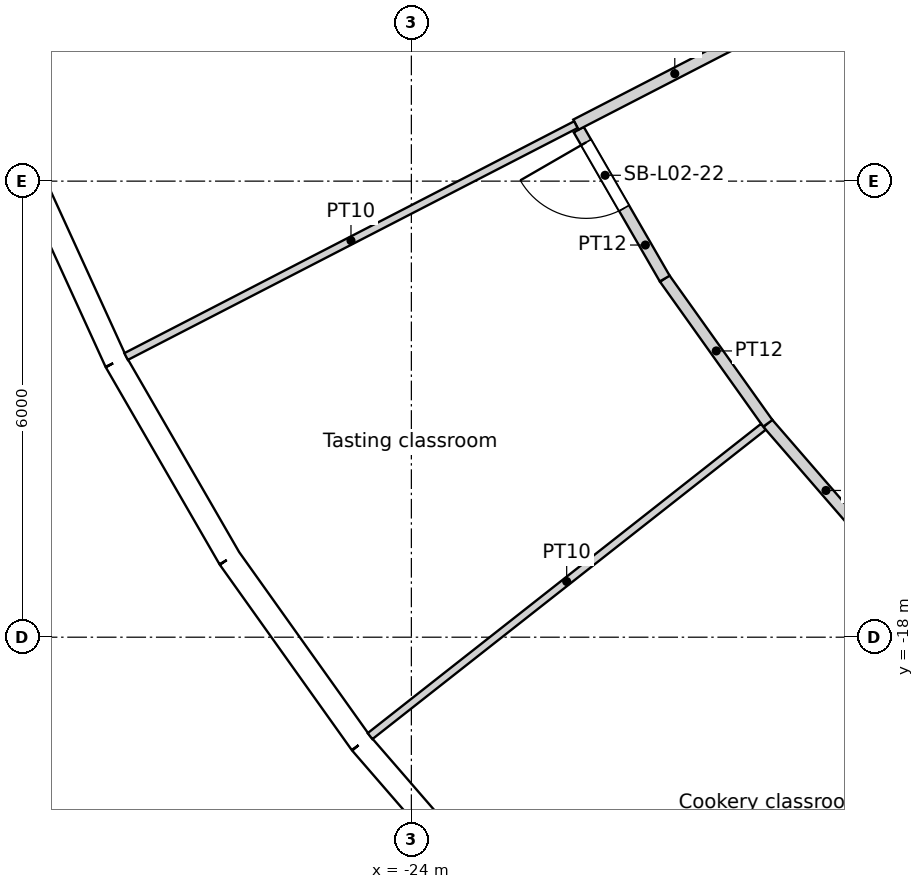
"""IFC4 building model, lengths in metres.
Left out: names, types, materials, properties, quantities, classifications, styles, units other than length and angle.
Written with IfcOpenShell. Run it as: python <this file> out.ifc"""

import sys

from ifc_helpers import new_model, si_unit, direction, frame, frame_2d, origin, origin_2d, place, context, subcontext, project, spatial, rectangle, circle, extrude, element, fill, save


model = new_model("IFC4")
c1 = context("Model", 3, precision=1e-05, world=origin(), true_north=direction((0.0, 1.0)))
c2 = subcontext(c1, "Body", "Model", "MODEL_VIEW")
j1 = project(units=[si_unit("LENGTHUNIT", "METRE"), si_unit("PLANEANGLEUNIT", "RADIAN")], contexts=[c1])
p1 = place(None, origin())
s1 = spatial("IfcSite", under=j1, at=p1, CompositionType="ELEMENT")
p2 = place(p1, origin())
s2 = spatial("IfcBuilding", under=s1, at=p2, CompositionType="ELEMENT")
p3 = place(p2, frame((0.0, 0.0, 13.8)))
s3 = spatial("IfcBuildingStorey", under=s2, at=p3, CompositionType="ELEMENT", Elevation=13.8)
for number, where, z_axis, x_axis in (
    (1, (-26.909, -13.873, 0.0), (0.0, 0.0, 1.0), (1.0, 0.0, 0.0)),
    (2, (-23.797, -18.715, 0.0), (0.0, 0.0, 1.0), (1.0, 0.0, 0.0)),
):
    element("IfcColumn", number, at=place(p3, frame(where, z_axis=z_axis, x_axis=x_axis)), inside=s3, PredefinedType="COLUMN", context=c2, shape_type="SweptSolid", body=[
        extrude(circle(Radius=0.7, at=origin_2d()), origin(), (0.0, 0.0, 1.0), 4.8),
    ])
p4 = place(p3, frame((-20.509, -13.489, 0.0), z_axis=(0.0, 0.0, 1.0), x_axis=(1.0, 0.0, 0.0)))
e3 = element("IfcColumn", 3, at=p4, inside=s3, PredefinedType="COLUMN", context=c2, shape_type="SweptSolid", body=[
    extrude(circle(Radius=0.75, at=origin_2d()), origin(), (0.0, 0.0, 1.0), 4.8),
])
p5 = place(p3, frame((-29.127, -11.661, 0.0), z_axis=(0.0, 0.0, 1.0), x_axis=(0.415373250944, -0.909651066289, 0.0)))
e4 = element("IfcWall", 4, at=p5, inside=s3, PredefinedType="SOLIDWALL", context=c2, shape_type="SweptSolid", body=[
    extrude(rectangle(XDim=2.986, YDim=0.3, at=frame_2d((1.493, 0.0))), origin(), (0.0, 0.0, 1.0), 4.35),
])
p6 = place(p5, frame((1.493, 0.0, 2.0)))
e5 = element("IfcOpeningElement", 5, at=p6, cuts=e4, PredefinedType="OPENING", context=c2, shape_type="SweptSolid", body=[
    extrude(circle(Radius=1.2, at=origin_2d()), frame((0.0, 0.16, 0.0), z_axis=(0.0, -1.0, 0.0), x_axis=(1.0, 0.0, 0.0)), (0.0, 0.0, 1.0), 0.32),
])
p7 = place(p3, frame((-27.887, -14.377, 0.0), z_axis=(0.0, 0.0, 1.0), x_axis=(0.500017373705, -0.866015372839, 0.0)))
e6 = element("IfcWall", 6, at=p7, inside=s3, PredefinedType="SOLIDWALL", context=c2, shape_type="SweptSolid", body=[
    extrude(rectangle(XDim=2.986, YDim=0.3, at=frame_2d((1.493, 0.0))), origin(), (0.0, 0.0, 1.0), 4.35),
])
p8 = place(p7, frame((1.493, 0.0, 2.0)))
e7 = element("IfcOpeningElement", 7, at=p8, cuts=e6, PredefinedType="OPENING", context=c2, shape_type="SweptSolid", body=[
    extrude(circle(Radius=1.2, at=origin_2d()), frame((0.0, 0.16, 0.0), z_axis=(0.0, -1.0, 0.0), x_axis=(1.0, 0.0, 0.0)), (0.0, 0.0, 1.0), 0.32),
])
p9 = place(p3, frame((-26.394, -16.962, 0.0), z_axis=(0.0, 0.0, 1.0), x_axis=(0.580100533892, -0.814544885551, 0.0)))
e8 = element("IfcWall", 8, at=p9, inside=s3, PredefinedType="SOLIDWALL", context=c2, shape_type="SweptSolid", body=[
    extrude(rectangle(XDim=2.986, YDim=0.3, at=frame_2d((1.493, 0.0))), origin(), (0.0, 0.0, 1.0), 4.35),
])
p10 = place(p9, frame((1.493, 0.0, 2.0)))
e9 = element("IfcOpeningElement", 9, at=p10, cuts=e8, PredefinedType="OPENING", context=c2, shape_type="SweptSolid", body=[
    extrude(circle(Radius=1.2, at=origin_2d()), frame((0.0, 0.16, 0.0), z_axis=(0.0, -1.0, 0.0), x_axis=(1.0, 0.0, 0.0)), (0.0, 0.0, 1.0), 0.32),
])
p11 = place(p3, frame((-24.662, -19.394, 0.0), z_axis=(0.0, 0.0, 1.0), x_axis=(0.654809121128, -0.755794294029, 0.0)))
e10 = element("IfcWall", 10, at=p11, inside=s3, PredefinedType="SOLIDWALL", context=c2, shape_type="SweptSolid", body=[
    extrude(rectangle(XDim=2.986, YDim=0.3, at=frame_2d((1.493, 0.0))), origin(), (0.0, 0.0, 1.0), 4.35),
])
p12 = place(p11, frame((1.493, 0.0, 2.0)))
e11 = element("IfcOpeningElement", 11, at=p12, cuts=e10, PredefinedType="OPENING", context=c2, shape_type="SweptSolid", body=[
    extrude(circle(Radius=1.2, at=origin_2d()), frame((0.0, 0.16, 0.0), z_axis=(0.0, -1.0, 0.0), x_axis=(1.0, 0.0, 0.0)), (0.0, 0.0, 1.0), 0.32),
])
p13 = place(p3, frame((-27.753, -14.308, 0.0), z_axis=(0.0, 0.0, 1.0), x_axis=(0.888828839168, 0.458239342117, 0.0)))
e12 = element("IfcWall", 12, at=p13, inside=s3, PredefinedType="PARTITIONING", context=c2, shape_type="SweptSolid", body=[
    extrude(rectangle(XDim=6.658, YDim=0.1, at=frame_2d((3.329, 0.0))), origin(), (0.0, 0.0, 1.0), 3.75),
])
p14 = place(p3, frame((-24.544, -19.302, 0.0), z_axis=(0.0, 0.0, 1.0), x_axis=(0.786055722677, 0.618155644515, 0.0)))
e13 = element("IfcWall", 13, at=p14, inside=s3, PredefinedType="PARTITIONING", context=c2, shape_type="SweptSolid", body=[
    extrude(rectangle(XDim=6.583, YDim=0.1, at=frame_2d((3.291, 0.0))), origin(), (0.0, 0.0, 1.0), 3.75),
])
p15 = place(p3, frame((-20.667, -13.282, 0.0), z_axis=(0.0, 0.0, 1.0), x_axis=(-0.500049307386, 0.86599693428, 0.0)))
e14 = element("IfcWall", 14, at=p15, inside=s3, PredefinedType="PARTITIONING", context=c2, shape_type="SweptSolid", body=[
    extrude(rectangle(XDim=2.263, YDim=0.15, at=frame_2d((1.131, 0.0))), origin(), (0.0, 0.0, 1.0), 3.75),
])
p16 = place(p15, frame((1.069, 0.0, 0.0)))
e15 = element("IfcOpeningElement", 15, at=p16, cuts=e14, PredefinedType="OPENING", context=c2, shape_type="SweptSolid", body=[
    extrude(rectangle(XDim=1.0, YDim=2.1, at=frame_2d((0.5, 1.05))), frame((0.0, 0.075, 0.0), z_axis=(0.0, -1.0, 0.0), x_axis=(1.0, 0.0, 0.0)), (0.0, 0.0, 1.0), 0.15),
])
p17 = place(p3, frame((-21.836, -11.257, 0.0), z_axis=(0.0, 0.0, 1.0), x_axis=(0.888822270684, 0.458252082522, 0.0)))
e16 = element("IfcWall", 16, at=p17, inside=s3, PredefinedType="PARTITIONING", context=c2, shape_type="SweptSolid", body=[
    extrude(rectangle(XDim=2.928, YDim=0.15, at=frame_2d((1.464, 0.0))), origin(), (0.0, 0.0, 1.0), 3.75),
])
p18 = place(p3, frame((-20.667, -13.282, 0.0), z_axis=(0.0, 0.0, 1.0), x_axis=(0.580032319147, -0.814593462252, 0.0)))
e17 = element("IfcWall", 17, at=p18, inside=s3, PredefinedType="PARTITIONING", context=c2, shape_type="SweptSolid", body=[
    extrude(rectangle(XDim=2.338, YDim=0.15, at=frame_2d((1.169, 0.0))), origin(), (0.0, 0.0, 1.0), 3.75),
])
p19 = place(p3, frame((-19.311, -15.186, 0.0), z_axis=(0.0, 0.0, 1.0), x_axis=(0.654866925236, -0.755744209526, 0.0)))
e18 = element("IfcWall", 18, at=p19, inside=s3, PredefinedType="PARTITIONING", context=c2, shape_type="SweptSolid", body=[
    extrude(rectangle(XDim=2.338, YDim=0.15, at=frame_2d((1.169, 0.0))), origin(), (0.0, 0.0, 1.0), 3.75),
])
p20 = place(p6, origin())
e19 = element("IfcWindow", 19, at=p20, inside=s3, PartitioningType="SINGLE_PANEL", PredefinedType="WINDOW", context=c2, shape_type="SweptSolid", body=[
    extrude(circle(Radius=1.2, at=origin_2d()), frame((0.0, 0.12, 0.0), z_axis=(0.0, -1.0, 0.0), x_axis=(1.0, 0.0, 0.0)), (0.0, 0.0, 1.0), 0.1),
])
fill(e5, e19)
p21 = place(p8, origin())
e20 = element("IfcWindow", 20, at=p21, inside=s3, PartitioningType="SINGLE_PANEL", PredefinedType="WINDOW", context=c2, shape_type="SweptSolid", body=[
    extrude(circle(Radius=1.2, at=origin_2d()), frame((0.0, 0.12, 0.0), z_axis=(0.0, -1.0, 0.0), x_axis=(1.0, 0.0, 0.0)), (0.0, 0.0, 1.0), 0.1),
])
fill(e7, e20)
p22 = place(p10, origin())
e21 = element("IfcWindow", 21, at=p22, inside=s3, PartitioningType="SINGLE_PANEL", PredefinedType="WINDOW", context=c2, shape_type="SweptSolid", body=[
    extrude(circle(Radius=1.2, at=origin_2d()), frame((0.0, 0.12, 0.0), z_axis=(0.0, -1.0, 0.0), x_axis=(1.0, 0.0, 0.0)), (0.0, 0.0, 1.0), 0.1),
])
fill(e9, e21)
p23 = place(p12, origin())
e22 = element("IfcWindow", 22, at=p23, inside=s3, PartitioningType="SINGLE_PANEL", PredefinedType="WINDOW", context=c2, shape_type="SweptSolid", body=[
    extrude(circle(Radius=1.2, at=origin_2d()), frame((0.0, 0.12, 0.0), z_axis=(0.0, -1.0, 0.0), x_axis=(1.0, 0.0, 0.0)), (0.0, 0.0, 1.0), 0.1),
])
fill(e11, e22)
p24 = place(p16, origin())
e23 = element("IfcDoor", 23, at=p24, inside=s3, OperationType="SINGLE_SWING_RIGHT", PredefinedType="DOOR", context=c2, shape_type="SweptSolid", body=[
    extrude(rectangle(XDim=1.0, YDim=2.1, at=frame_2d((0.5, 1.05))), frame((0.0, 0.025, 0.0), z_axis=(0.0, -1.0, 0.0), x_axis=(1.0, 0.0, 0.0)), (0.0, 0.0, 1.0), 0.05),
])
fill(e15, e23)
save(model, sys.argv[1])
